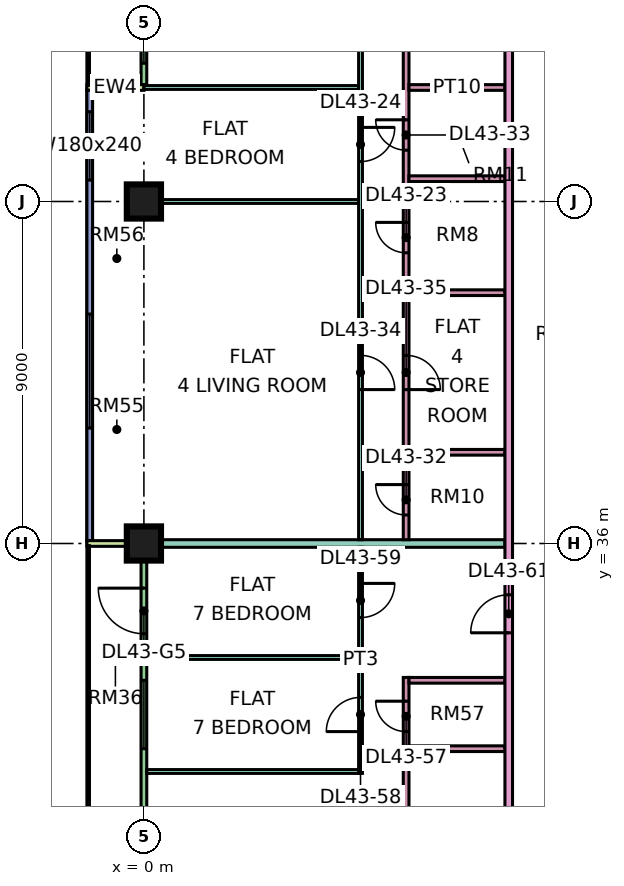
"""IFC4 building model, lengths in metres.
Left out: names, types, materials, properties, quantities, classifications, styles, units other than length and angle.
Written with IfcOpenShell. Run it as: python <this file> out.ifc"""

import sys

from ifc_helpers import new_model, si_unit, direction, frame, frame_2d, origin, origin_2d, place, context, subcontext, project, spatial, rectangle, extrude, element, fill, save


model = new_model("IFC4")
c1 = context("Model", 3, precision=1e-05, world=origin(), true_north=direction((0.0, 1.0)))
c2 = subcontext(c1, "Body", "Model", "MODEL_VIEW")
j1 = project(units=[si_unit("LENGTHUNIT", "METRE"), si_unit("PLANEANGLEUNIT", "RADIAN")], contexts=[c1])
p1 = place(None, origin())
s1 = spatial("IfcSite", under=j1, at=p1, CompositionType="ELEMENT")
p2 = place(p1, origin())
s2 = spatial("IfcBuilding", under=s1, at=p2, CompositionType="ELEMENT")
p3 = place(p2, frame((0.0, 0.0, 187.4)))
s3 = spatial("IfcBuildingStorey", under=s2, at=p3, CompositionType="ELEMENT", Elevation=187.4)
p4 = place(p3, frame((0.0, 36.0, 0.0), z_axis=(0.0, 0.0, 1.0), x_axis=(1.0, 0.0, 0.0)))
e1 = element("IfcColumn", 1, at=p4, inside=s3, PredefinedType="COLUMN", context=c2, shape_type="SweptSolid", body=[
    extrude(rectangle(XDim=0.9, YDim=0.9, at=origin_2d()), origin(), (0.0, 0.0, 1.0), 3.75),
])
p5 = place(p3, frame((0.0, 45.0, 0.0), z_axis=(0.0, 0.0, 1.0), x_axis=(1.0, 0.0, 0.0)))
e2 = element("IfcColumn", 2, at=p5, inside=s3, PredefinedType="COLUMN", context=c2, shape_type="SweptSolid", body=[
    extrude(rectangle(XDim=0.9, YDim=0.9, at=origin_2d()), origin(), (0.0, 0.0, 1.0), 3.75),
])
p6 = place(p3, frame((0.0, 61.425, 0.0), z_axis=(0.0, 0.0, 1.0), x_axis=(0.0, -1.0, 0.0)))
e3 = element("IfcWall", 3, at=p6, inside=s3, PredefinedType="SOLIDWALL", context=c2, shape_type="SweptSolid", body=[
    extrude(rectangle(XDim=13.35, YDim=0.15, at=frame_2d((6.675, 0.0))), origin(), (0.0, 0.0, 1.0), 3.35),
])
p7 = place(p6, frame((0.262, 0.0, 0.45)))
e4 = element("IfcOpeningElement", 4, at=p7, cuts=e3, PredefinedType="OPENING", context=c2, shape_type="SweptSolid", body=[
    extrude(rectangle(XDim=0.9, YDim=2.4, at=frame_2d((0.45, 1.2))), frame((0.0, 0.085, 0.0), z_axis=(0.0, -1.0, 0.0), x_axis=(1.0, 0.0, 0.0)), (0.0, 0.0, 1.0), 0.17),
])
p8 = place(p6, frame((2.025, 0.0, 0.0)))
e5 = element("IfcOpeningElement", 5, at=p8, cuts=e3, PredefinedType="OPENING", context=c2, shape_type="SweptSolid", body=[
    extrude(rectangle(XDim=1.8, YDim=2.4, at=frame_2d((0.9, 1.2))), frame((0.0, 0.085, 0.0), z_axis=(0.0, -1.0, 0.0), x_axis=(1.0, 0.0, 0.0)), (0.0, 0.0, 1.0), 0.17),
])
p9 = place(p6, frame((5.05, 0.0, 0.45)))
e6 = element("IfcOpeningElement", 6, at=p9, cuts=e3, PredefinedType="OPENING", context=c2, shape_type="SweptSolid", body=[
    extrude(rectangle(XDim=1.2, YDim=2.4, at=frame_2d((0.6, 1.2))), frame((0.0, 0.085, 0.0), z_axis=(0.0, -1.0, 0.0), x_axis=(1.0, 0.0, 0.0)), (0.0, 0.0, 1.0), 0.17),
])
p10 = place(p6, frame((8.6, 0.0, 0.45)))
e7 = element("IfcOpeningElement", 7, at=p10, cuts=e3, PredefinedType="OPENING", context=c2, shape_type="SweptSolid", body=[
    extrude(rectangle(XDim=1.2, YDim=2.4, at=frame_2d((0.6, 1.2))), frame((0.0, 0.085, 0.0), z_axis=(0.0, -1.0, 0.0), x_axis=(1.0, 0.0, 0.0)), (0.0, 0.0, 1.0), 0.17),
])
p11 = place(p6, frame((10.988, 0.0, 0.45)))
e8 = element("IfcOpeningElement", 8, at=p11, cuts=e3, PredefinedType="OPENING", context=c2, shape_type="SweptSolid", body=[
    extrude(rectangle(XDim=1.8, YDim=2.4, at=frame_2d((0.9, 1.2))), frame((0.0, 0.085, 0.0), z_axis=(0.0, -1.0, 0.0), x_axis=(1.0, 0.0, 0.0)), (0.0, 0.0, 1.0), 0.17),
])
p12 = place(p3, frame((-1.5, 48.0, 0.0), z_axis=(0.0, 0.0, 1.0), x_axis=(1.0, 0.0, 0.0)))
e9 = element("IfcWall", 9, at=p12, inside=s3, PredefinedType="SOLIDWALL", context=c2, shape_type="SweptSolid", body=[
    extrude(rectangle(XDim=1.5, YDim=0.15, at=frame_2d((0.75, 0.0))), origin(), (0.0, 0.0, 1.0), 3.35),
])
p13 = place(p3, frame((-1.425, 47.925, 0.0), z_axis=(0.0, 0.0, 1.0), x_axis=(0.0, -1.0, 0.0)))
e10 = element("IfcWall", 10, at=p13, inside=s3, PredefinedType="SOLIDWALL", context=c2, shape_type="SweptSolid", body=[
    extrude(rectangle(XDim=11.85, YDim=0.15, at=frame_2d((5.925, 0.0))), origin(), (0.0, 0.0, 1.0), 3.35),
])
p14 = place(p13, frame((0.562, 0.0, 0.45)))
e11 = element("IfcOpeningElement", 11, at=p14, cuts=e10, PredefinedType="OPENING", context=c2, shape_type="SweptSolid", body=[
    extrude(rectangle(XDim=1.8, YDim=2.4, at=frame_2d((0.9, 1.2))), frame((0.0, 0.085, 0.0), z_axis=(0.0, -1.0, 0.0), x_axis=(1.0, 0.0, 0.0)), (0.0, 0.0, 1.0), 0.17),
])
p15 = place(p13, frame((5.887, 0.0, 0.45)))
e12 = element("IfcOpeningElement", 12, at=p15, cuts=e10, PredefinedType="OPENING", context=c2, shape_type="SweptSolid", body=[
    extrude(rectangle(XDim=3.0, YDim=2.4, at=frame_2d((1.5, 1.2))), frame((0.0, 0.085, 0.0), z_axis=(0.0, -1.0, 0.0), x_axis=(1.0, 0.0, 0.0)), (0.0, 0.0, 1.0), 0.17),
])
p16 = place(p3, frame((0.0, 35.925, 0.0), z_axis=(0.0, 0.0, 1.0), x_axis=(0.0, -1.0, 0.0)))
e13 = element("IfcWall", 13, at=p16, inside=s3, PredefinedType="SOLIDWALL", context=c2, shape_type="SweptSolid", body=[
    extrude(rectangle(XDim=11.85, YDim=0.15, at=frame_2d((5.925, 0.0))), origin(), (0.0, 0.0, 1.0), 3.35),
])
p17 = place(p16, frame((1.1, 0.0, 0.0)))
e14 = element("IfcOpeningElement", 14, at=p17, cuts=e13, PredefinedType="OPENING", context=c2, shape_type="SweptSolid", body=[
    extrude(rectangle(XDim=1.2, YDim=2.4, at=frame_2d((0.6, 1.2))), frame((0.0, 0.085, 0.0), z_axis=(0.0, -1.0, 0.0), x_axis=(1.0, 0.0, 0.0)), (0.0, 0.0, 1.0), 0.17),
])
p18 = place(p16, frame((3.525, 0.0, 0.45)))
e15 = element("IfcOpeningElement", 15, at=p18, cuts=e13, PredefinedType="OPENING", context=c2, shape_type="SweptSolid", body=[
    extrude(rectangle(XDim=1.8, YDim=2.4, at=frame_2d((0.9, 1.2))), frame((0.0, 0.085, 0.0), z_axis=(0.0, -1.0, 0.0), x_axis=(1.0, 0.0, 0.0)), (0.0, 0.0, 1.0), 0.17),
])
p19 = place(p16, frame((7.15, 0.0, 0.45)))
e16 = element("IfcOpeningElement", 16, at=p19, cuts=e13, PredefinedType="OPENING", context=c2, shape_type="SweptSolid", body=[
    extrude(rectangle(XDim=3.0, YDim=2.4, at=frame_2d((1.5, 1.2))), frame((0.0, 0.085, 0.0), z_axis=(0.0, -1.0, 0.0), x_axis=(1.0, 0.0, 0.0)), (0.0, 0.0, 1.0), 0.17),
])
p20 = place(p3, frame((-1.5, 36.0, 0.0), z_axis=(0.0, 0.0, 1.0), x_axis=(1.0, 0.0, 0.0)))
e17 = element("IfcWall", 17, at=p20, inside=s3, PredefinedType="SOLIDWALL", context=c2, shape_type="SweptSolid", body=[
    extrude(rectangle(XDim=1.5, YDim=0.15, at=frame_2d((0.75, 0.0))), origin(), (0.0, 0.0, 1.0), 3.35),
])
e18 = element("IfcWall", 18, at=p4, inside=s3, PredefinedType="PARTITIONING", context=c2, shape_type="SweptSolid", body=[
    extrude(rectangle(XDim=9.5, YDim=0.2, at=frame_2d((4.75, 0.0))), origin(), (0.0, 0.0, 1.0), 3.35),
])
e19 = element("IfcWall", 19, at=p5, inside=s3, PredefinedType="PARTITIONING", context=c2, shape_type="SweptSolid", body=[
    extrude(rectangle(XDim=5.65, YDim=0.1, at=frame_2d((2.825, 0.0))), origin(), (0.0, 0.0, 1.0), 3.35),
])
p21 = place(p3, frame((0.0, 48.0, 0.0), z_axis=(0.0, 0.0, 1.0), x_axis=(1.0, 0.0, 0.0)))
e20 = element("IfcWall", 20, at=p21, inside=s3, PredefinedType="PARTITIONING", context=c2, shape_type="SweptSolid", body=[
    extrude(rectangle(XDim=5.65, YDim=0.1, at=frame_2d((2.825, 0.0))), origin(), (0.0, 0.0, 1.0), 3.35),
])
for number, where, z_axis, x_axis in (
    (21, (0.074, 30.0, 0.0), (0.0, 0.0, 1.0), (1.0, 0.0, 0.0)),
    (22, (0.074, 33.0, 0.0), (0.0, 0.0, 1.0), (1.0, 0.0, 0.0)),
):
    element("IfcWall", number, at=place(p3, frame(where, z_axis=z_axis, x_axis=x_axis)), inside=s3, PredefinedType="PARTITIONING", context=c2, shape_type="SweptSolid", body=[
        extrude(rectangle(XDim=5.576, YDim=0.1, at=frame_2d((2.788, 0.0))), origin(), (0.0, 0.0, 1.0), 3.35),
    ])
p22 = place(p3, frame((5.7, 29.95, 0.0), z_axis=(0.0, 0.0, 1.0), x_axis=(0.0, 1.0, 0.0)))
e23 = element("IfcWall", 23, at=p22, inside=s3, PredefinedType="PARTITIONING", context=c2, shape_type="SweptSolid", body=[
    extrude(rectangle(XDim=5.95, YDim=0.1, at=frame_2d((2.975, 0.0))), origin(), (0.0, 0.0, 1.0), 3.35),
])
p23 = place(p22, frame((1.1, 0.0, 0.0)))
e24 = element("IfcOpeningElement", 24, at=p23, cuts=e23, PredefinedType="OPENING", context=c2, shape_type="SweptSolid", body=[
    extrude(rectangle(XDim=0.9, YDim=2.1, at=frame_2d((0.45, 1.05))), frame((0.0, 0.06, 0.0), z_axis=(0.0, -1.0, 0.0), x_axis=(1.0, 0.0, 0.0)), (0.0, 0.0, 1.0), 0.12),
])
p24 = place(p22, frame((4.1, 0.0, 0.0)))
e25 = element("IfcOpeningElement", 25, at=p24, cuts=e23, PredefinedType="OPENING", context=c2, shape_type="SweptSolid", body=[
    extrude(rectangle(XDim=0.9, YDim=2.1, at=frame_2d((0.45, 1.05))), frame((0.0, 0.06, 0.0), z_axis=(0.0, -1.0, 0.0), x_axis=(1.0, 0.0, 0.0)), (0.0, 0.0, 1.0), 0.12),
])
p25 = place(p3, frame((5.7, 36.1, 0.0), z_axis=(0.0, 0.0, 1.0), x_axis=(0.0, 1.0, 0.0)))
e26 = element("IfcWall", 26, at=p25, inside=s3, PredefinedType="PARTITIONING", context=c2, shape_type="SweptSolid", body=[
    extrude(rectangle(XDim=26.826, YDim=0.1, at=frame_2d((13.413, 0.0))), origin(), (0.0, 0.0, 1.0), 3.35),
])
p26 = place(p25, frame((9.95, 0.0, 0.0)))
e27 = element("IfcOpeningElement", 27, at=p26, cuts=e26, PredefinedType="OPENING", context=c2, shape_type="SweptSolid", body=[
    extrude(rectangle(XDim=0.9, YDim=2.1, at=frame_2d((0.45, 1.05))), frame((0.0, 0.06, 0.0), z_axis=(0.0, -1.0, 0.0), x_axis=(1.0, 0.0, 0.0)), (0.0, 0.0, 1.0), 0.12),
])
p27 = place(p25, frame((12.95, 0.0, 0.0)))
e28 = element("IfcOpeningElement", 28, at=p27, cuts=e26, PredefinedType="OPENING", context=c2, shape_type="SweptSolid", body=[
    extrude(rectangle(XDim=0.9, YDim=2.1, at=frame_2d((0.45, 1.05))), frame((0.0, 0.06, 0.0), z_axis=(0.0, -1.0, 0.0), x_axis=(1.0, 0.0, 0.0)), (0.0, 0.0, 1.0), 0.12),
])
p28 = place(p25, frame((15.95, 0.0, 0.0)))
e29 = element("IfcOpeningElement", 29, at=p28, cuts=e26, PredefinedType="OPENING", context=c2, shape_type="SweptSolid", body=[
    extrude(rectangle(XDim=0.9, YDim=2.1, at=frame_2d((0.45, 1.05))), frame((0.0, 0.06, 0.0), z_axis=(0.0, -1.0, 0.0), x_axis=(1.0, 0.0, 0.0)), (0.0, 0.0, 1.0), 0.12),
])
p29 = place(p25, frame((18.95, 0.0, 0.0)))
e30 = element("IfcOpeningElement", 30, at=p29, cuts=e26, PredefinedType="OPENING", context=c2, shape_type="SweptSolid", body=[
    extrude(rectangle(XDim=0.9, YDim=2.1, at=frame_2d((0.45, 1.05))), frame((0.0, 0.06, 0.0), z_axis=(0.0, -1.0, 0.0), x_axis=(1.0, 0.0, 0.0)), (0.0, 0.0, 1.0), 0.12),
])
p30 = place(p25, frame((24.95, 0.0, 0.0)))
e31 = element("IfcOpeningElement", 31, at=p30, cuts=e26, PredefinedType="OPENING", context=c2, shape_type="SweptSolid", body=[
    extrude(rectangle(XDim=0.9, YDim=2.1, at=frame_2d((0.45, 1.05))), frame((0.0, 0.06, 0.0), z_axis=(0.0, -1.0, 0.0), x_axis=(1.0, 0.0, 0.0)), (0.0, 0.0, 1.0), 0.12),
])
p31 = place(p25, frame((3.95, 0.0, 0.0)))
e32 = element("IfcOpeningElement", 32, at=p31, cuts=e26, PredefinedType="OPENING", context=c2, shape_type="SweptSolid", body=[
    extrude(rectangle(XDim=0.9, YDim=2.1, at=frame_2d((0.45, 1.05))), frame((0.0, 0.06, 0.0), z_axis=(0.0, -1.0, 0.0), x_axis=(1.0, 0.0, 0.0)), (0.0, 0.0, 1.0), 0.12),
])
p32 = place(p25, frame((21.95, 0.0, 0.0)))
e33 = element("IfcOpeningElement", 33, at=p32, cuts=e26, PredefinedType="OPENING", context=c2, shape_type="SweptSolid", body=[
    extrude(rectangle(XDim=0.9, YDim=2.1, at=frame_2d((0.45, 1.05))), frame((0.0, 0.06, 0.0), z_axis=(0.0, -1.0, 0.0), x_axis=(1.0, 0.0, 0.0)), (0.0, 0.0, 1.0), 0.12),
])
p33 = place(p3, frame((6.9, 22.5, 0.0), z_axis=(0.0, 0.0, 1.0), x_axis=(0.0, 1.0, 0.0)))
e34 = element("IfcWall", 34, at=p33, inside=s3, PredefinedType="PARTITIONING", context=c2, shape_type="SweptSolid", body=[
    extrude(rectangle(XDim=9.975, YDim=0.15, at=frame_2d((4.988, 0.0))), origin(), (0.0, 0.0, 1.0), 3.35),
])
p34 = place(p33, frame((8.55, 0.0, 0.0)))
e35 = element("IfcOpeningElement", 35, at=p34, cuts=e34, PredefinedType="OPENING", context=c2, shape_type="SweptSolid", body=[
    extrude(rectangle(XDim=0.8, YDim=2.1, at=frame_2d((0.4, 1.05))), frame((0.0, 0.085, 0.0), z_axis=(0.0, -1.0, 0.0), x_axis=(1.0, 0.0, 0.0)), (0.0, 0.0, 1.0), 0.17),
])
p35 = place(p33, frame((3.5, 0.0, 0.0)))
e36 = element("IfcOpeningElement", 36, at=p35, cuts=e34, PredefinedType="OPENING", context=c2, shape_type="SweptSolid", body=[
    extrude(rectangle(XDim=0.9, YDim=2.1, at=frame_2d((0.45, 1.05))), frame((0.0, 0.085, 0.0), z_axis=(0.0, -1.0, 0.0), x_axis=(1.0, 0.0, 0.0)), (0.0, 0.0, 1.0), 0.17),
])
p36 = place(p3, frame((6.9, 36.1, 0.0), z_axis=(0.0, 0.0, 1.0), x_axis=(0.0, 1.0, 0.0)))
e37 = element("IfcWall", 37, at=p36, inside=s3, PredefinedType="PARTITIONING", context=c2, shape_type="SweptSolid", body=[
    extrude(rectangle(XDim=14.675, YDim=0.15, at=frame_2d((7.337, 0.0))), origin(), (0.0, 0.0, 1.0), 3.35),
])
p37 = place(p36, frame((7.55, 0.0, 0.0)))
e38 = element("IfcOpeningElement", 38, at=p37, cuts=e37, PredefinedType="OPENING", context=c2, shape_type="SweptSolid", body=[
    extrude(rectangle(XDim=0.8, YDim=2.1, at=frame_2d((0.4, 1.05))), frame((0.0, 0.085, 0.0), z_axis=(0.0, -1.0, 0.0), x_axis=(1.0, 0.0, 0.0)), (0.0, 0.0, 1.0), 0.17),
])
p38 = place(p36, frame((0.65, 0.0, 0.0)))
e39 = element("IfcOpeningElement", 39, at=p38, cuts=e37, PredefinedType="OPENING", context=c2, shape_type="SweptSolid", body=[
    extrude(rectangle(XDim=0.8, YDim=2.1, at=frame_2d((0.4, 1.05))), frame((0.0, 0.085, 0.0), z_axis=(0.0, -1.0, 0.0), x_axis=(1.0, 0.0, 0.0)), (0.0, 0.0, 1.0), 0.17),
])
p39 = place(p36, frame((10.25, 0.0, 0.0)))
e40 = element("IfcOpeningElement", 40, at=p39, cuts=e37, PredefinedType="OPENING", context=c2, shape_type="SweptSolid", body=[
    extrude(rectangle(XDim=0.8, YDim=2.1, at=frame_2d((0.4, 1.05))), frame((0.0, 0.085, 0.0), z_axis=(0.0, -1.0, 0.0), x_axis=(1.0, 0.0, 0.0)), (0.0, 0.0, 1.0), 0.17),
])
p40 = place(p36, frame((3.95, 0.0, 0.0)))
e41 = element("IfcOpeningElement", 41, at=p40, cuts=e37, PredefinedType="OPENING", context=c2, shape_type="SweptSolid", body=[
    extrude(rectangle(XDim=0.9, YDim=2.1, at=frame_2d((0.45, 1.05))), frame((0.0, 0.085, 0.0), z_axis=(0.0, -1.0, 0.0), x_axis=(1.0, 0.0, 0.0)), (0.0, 0.0, 1.0), 0.17),
])
for number, where, z_axis, x_axis in (
    (42, (6.975, 30.6, 0.0), (0.0, 0.0, 1.0), (1.0, 0.0, 0.0)),
    (43, (6.975, 32.4, 0.0), (0.0, 0.0, 1.0), (1.0, 0.0, 0.0)),
    (44, (6.975, 38.4, 0.0), (0.0, 0.0, 1.0), (1.0, 0.0, 0.0)),
    (45, (6.975, 42.6, 0.0), (0.0, 0.0, 1.0), (1.0, 0.0, 0.0)),
    (46, (6.975, 45.6, 0.0), (0.0, 0.0, 1.0), (1.0, 0.0, 0.0)),
    (47, (6.975, 48.0, 0.0), (0.0, 0.0, 1.0), (1.0, 0.0, 0.0)),
):
    element("IfcWall", number, at=place(p3, frame(where, z_axis=z_axis, x_axis=x_axis)), inside=s3, PredefinedType="PARTITIONING", context=c2, shape_type="SweptSolid", body=[
        extrude(rectangle(XDim=2.525, YDim=0.15, at=frame_2d((1.262, 0.0))), origin(), (0.0, 0.0, 1.0), 3.35),
    ])
p41 = place(p3, frame((9.6, 20.0, 0.0), z_axis=(0.0, 0.0, 1.0), x_axis=(0.0, 1.0, 0.0)))
e48 = element("IfcWall", 48, at=p41, inside=s3, PredefinedType="PARTITIONING", context=c2, shape_type="SweptSolid", body=[
    extrude(rectangle(XDim=42.926, YDim=0.2, at=frame_2d((21.463, 0.0))), origin(), (0.0, 0.0, 1.0), 3.35),
])
p42 = place(p41, frame((31.65, 0.0, 0.0)))
e49 = element("IfcOpeningElement", 49, at=p42, cuts=e48, PredefinedType="OPENING", context=c2, shape_type="SweptSolid", body=[
    extrude(rectangle(XDim=1.0, YDim=2.1, at=frame_2d((0.5, 1.05))), frame((0.0, 0.11, 0.0), z_axis=(0.0, -1.0, 0.0), x_axis=(1.0, 0.0, 0.0)), (0.0, 0.0, 1.0), 0.22),
])
p43 = place(p41, frame((0.6, 0.0, 0.0)))
e50 = element("IfcOpeningElement", 50, at=p43, cuts=e48, PredefinedType="OPENING", context=c2, shape_type="SweptSolid", body=[
    extrude(rectangle(XDim=1.2, YDim=2.1, at=frame_2d((0.6, 1.05))), frame((0.0, 0.11, 0.0), z_axis=(0.0, -1.0, 0.0), x_axis=(1.0, 0.0, 0.0)), (0.0, 0.0, 1.0), 0.22),
])
p44 = place(p41, frame((13.65, 0.0, 0.0)))
e51 = element("IfcOpeningElement", 51, at=p44, cuts=e48, PredefinedType="OPENING", context=c2, shape_type="SweptSolid", body=[
    extrude(rectangle(XDim=1.0, YDim=2.1, at=frame_2d((0.5, 1.05))), frame((0.0, 0.11, 0.0), z_axis=(0.0, -1.0, 0.0), x_axis=(1.0, 0.0, 0.0)), (0.0, 0.0, 1.0), 0.22),
])
p45 = place(p11, origin())
e52 = element("IfcWindow", 52, at=p45, inside=s3, PartitioningType="SINGLE_PANEL", PredefinedType="WINDOW", context=c2, shape_type="SweptSolid", body=[
    extrude(rectangle(XDim=1.8, YDim=2.4, at=frame_2d((0.9, 1.2))), frame((0.0, 0.03, 0.0), z_axis=(0.0, -1.0, 0.0), x_axis=(1.0, 0.0, 0.0)), (0.0, 0.0, 1.0), 0.06),
])
fill(e8, e52)
p46 = place(p14, origin())
e53 = element("IfcWindow", 53, at=p46, inside=s3, PartitioningType="SINGLE_PANEL", PredefinedType="WINDOW", context=c2, shape_type="SweptSolid", body=[
    extrude(rectangle(XDim=1.8, YDim=2.4, at=frame_2d((0.9, 1.2))), frame((0.0, 0.03, 0.0), z_axis=(0.0, -1.0, 0.0), x_axis=(1.0, 0.0, 0.0)), (0.0, 0.0, 1.0), 0.06),
])
fill(e11, e53)
p47 = place(p15, origin())
e54 = element("IfcWindow", 54, at=p47, inside=s3, PartitioningType="SINGLE_PANEL", PredefinedType="WINDOW", context=c2, shape_type="SweptSolid", body=[
    extrude(rectangle(XDim=3.0, YDim=2.4, at=frame_2d((1.5, 1.2))), frame((0.0, 0.03, 0.0), z_axis=(0.0, -1.0, 0.0), x_axis=(1.0, 0.0, 0.0)), (0.0, 0.0, 1.0), 0.06),
])
fill(e12, e54)
p48 = place(p17, frame((1.2, 0.0, 0.0), z_axis=(0.0, 0.0, 1.0), x_axis=(-1.0, 0.0, 0.0)))
e55 = element("IfcDoor", 55, at=p48, inside=s3, OperationType="DOUBLE_DOOR_SINGLE_SWING", PredefinedType="DOOR", context=c2, shape_type="SweptSolid", body=[
    extrude(rectangle(XDim=1.2, YDim=2.4, at=frame_2d((0.6, 1.2))), frame((0.0, 0.025, 0.0), z_axis=(0.0, -1.0, 0.0), x_axis=(1.0, 0.0, 0.0)), (0.0, 0.0, 1.0), 0.05),
])
fill(e14, e55)
p49 = place(p18, origin())
e56 = element("IfcWindow", 56, at=p49, inside=s3, PartitioningType="SINGLE_PANEL", PredefinedType="WINDOW", context=c2, shape_type="SweptSolid", body=[
    extrude(rectangle(XDim=1.8, YDim=2.4, at=frame_2d((0.9, 1.2))), frame((0.0, 0.03, 0.0), z_axis=(0.0, -1.0, 0.0), x_axis=(1.0, 0.0, 0.0)), (0.0, 0.0, 1.0), 0.06),
])
fill(e15, e56)
p50 = place(p37, frame((0.8, 0.0, 0.0), z_axis=(0.0, 0.0, 1.0), x_axis=(-1.0, 0.0, 0.0)))
e57 = element("IfcDoor", 57, at=p50, inside=s3, OperationType="SINGLE_SWING_RIGHT", PredefinedType="DOOR", context=c2, shape_type="SweptSolid", body=[
    extrude(rectangle(XDim=0.8, YDim=2.1, at=frame_2d((0.4, 1.05))), frame((0.0, 0.025, 0.0), z_axis=(0.0, -1.0, 0.0), x_axis=(1.0, 0.0, 0.0)), (0.0, 0.0, 1.0), 0.05),
])
fill(e38, e57)
p51 = place(p26, origin())
e58 = element("IfcDoor", 58, at=p51, inside=s3, OperationType="SINGLE_SWING_RIGHT", PredefinedType="DOOR", context=c2, shape_type="SweptSolid", body=[
    extrude(rectangle(XDim=0.9, YDim=2.1, at=frame_2d((0.45, 1.05))), frame((0.0, 0.025, 0.0), z_axis=(0.0, -1.0, 0.0), x_axis=(1.0, 0.0, 0.0)), (0.0, 0.0, 1.0), 0.05),
])
fill(e27, e58)
p52 = place(p38, frame((0.8, 0.0, 0.0), z_axis=(0.0, 0.0, 1.0), x_axis=(-1.0, 0.0, 0.0)))
e59 = element("IfcDoor", 59, at=p52, inside=s3, OperationType="SINGLE_SWING_RIGHT", PredefinedType="DOOR", context=c2, shape_type="SweptSolid", body=[
    extrude(rectangle(XDim=0.8, YDim=2.1, at=frame_2d((0.4, 1.05))), frame((0.0, 0.025, 0.0), z_axis=(0.0, -1.0, 0.0), x_axis=(1.0, 0.0, 0.0)), (0.0, 0.0, 1.0), 0.05),
])
fill(e39, e59)
p53 = place(p39, frame((0.8, 0.0, 0.0), z_axis=(0.0, 0.0, 1.0), x_axis=(-1.0, 0.0, 0.0)))
e60 = element("IfcDoor", 60, at=p53, inside=s3, OperationType="SINGLE_SWING_RIGHT", PredefinedType="DOOR", context=c2, shape_type="SweptSolid", body=[
    extrude(rectangle(XDim=0.8, YDim=2.1, at=frame_2d((0.4, 1.05))), frame((0.0, 0.025, 0.0), z_axis=(0.0, -1.0, 0.0), x_axis=(1.0, 0.0, 0.0)), (0.0, 0.0, 1.0), 0.05),
])
fill(e40, e60)
p54 = place(p31, frame((0.9, 0.0, 0.0), z_axis=(0.0, 0.0, 1.0), x_axis=(-1.0, 0.0, 0.0)))
e61 = element("IfcDoor", 61, at=p54, inside=s3, OperationType="SINGLE_SWING_LEFT", PredefinedType="DOOR", context=c2, shape_type="SweptSolid", body=[
    extrude(rectangle(XDim=0.9, YDim=2.1, at=frame_2d((0.45, 1.05))), frame((0.0, 0.025, 0.0), z_axis=(0.0, -1.0, 0.0), x_axis=(1.0, 0.0, 0.0)), (0.0, 0.0, 1.0), 0.05),
])
fill(e32, e61)
p55 = place(p40, frame((0.9, 0.0, 0.0), z_axis=(0.0, 0.0, 1.0), x_axis=(-1.0, 0.0, 0.0)))
e62 = element("IfcDoor", 62, at=p55, inside=s3, OperationType="SINGLE_SWING_LEFT", PredefinedType="DOOR", context=c2, shape_type="SweptSolid", body=[
    extrude(rectangle(XDim=0.9, YDim=2.1, at=frame_2d((0.45, 1.05))), frame((0.0, 0.025, 0.0), z_axis=(0.0, -1.0, 0.0), x_axis=(1.0, 0.0, 0.0)), (0.0, 0.0, 1.0), 0.05),
])
fill(e41, e62)
p56 = place(p34, frame((0.8, 0.0, 0.0), z_axis=(0.0, 0.0, 1.0), x_axis=(-1.0, 0.0, 0.0)))
e63 = element("IfcDoor", 63, at=p56, inside=s3, OperationType="SINGLE_SWING_RIGHT", PredefinedType="DOOR", context=c2, shape_type="SweptSolid", body=[
    extrude(rectangle(XDim=0.8, YDim=2.1, at=frame_2d((0.4, 1.05))), frame((0.0, 0.025, 0.0), z_axis=(0.0, -1.0, 0.0), x_axis=(1.0, 0.0, 0.0)), (0.0, 0.0, 1.0), 0.05),
])
fill(e35, e63)
p57 = place(p23, origin())
e64 = element("IfcDoor", 64, at=p57, inside=s3, OperationType="SINGLE_SWING_LEFT", PredefinedType="DOOR", context=c2, shape_type="SweptSolid", body=[
    extrude(rectangle(XDim=0.9, YDim=2.1, at=frame_2d((0.45, 1.05))), frame((0.0, 0.025, 0.0), z_axis=(0.0, -1.0, 0.0), x_axis=(1.0, 0.0, 0.0)), (0.0, 0.0, 1.0), 0.05),
])
fill(e24, e64)
p58 = place(p24, origin())
e65 = element("IfcDoor", 65, at=p58, inside=s3, OperationType="SINGLE_SWING_RIGHT", PredefinedType="DOOR", context=c2, shape_type="SweptSolid", body=[
    extrude(rectangle(XDim=0.9, YDim=2.1, at=frame_2d((0.45, 1.05))), frame((0.0, 0.025, 0.0), z_axis=(0.0, -1.0, 0.0), x_axis=(1.0, 0.0, 0.0)), (0.0, 0.0, 1.0), 0.05),
])
fill(e25, e65)
p59 = place(p44, origin())
e66 = element("IfcDoor", 66, at=p59, inside=s3, OperationType="SINGLE_SWING_LEFT", PredefinedType="DOOR", context=c2, shape_type="SweptSolid", body=[
    extrude(rectangle(XDim=1.0, YDim=2.1, at=frame_2d((0.5, 1.05))), frame((0.0, 0.025, 0.0), z_axis=(0.0, -1.0, 0.0), x_axis=(1.0, 0.0, 0.0)), (0.0, 0.0, 1.0), 0.05),
])
fill(e51, e66)
save(model, sys.argv[1])
